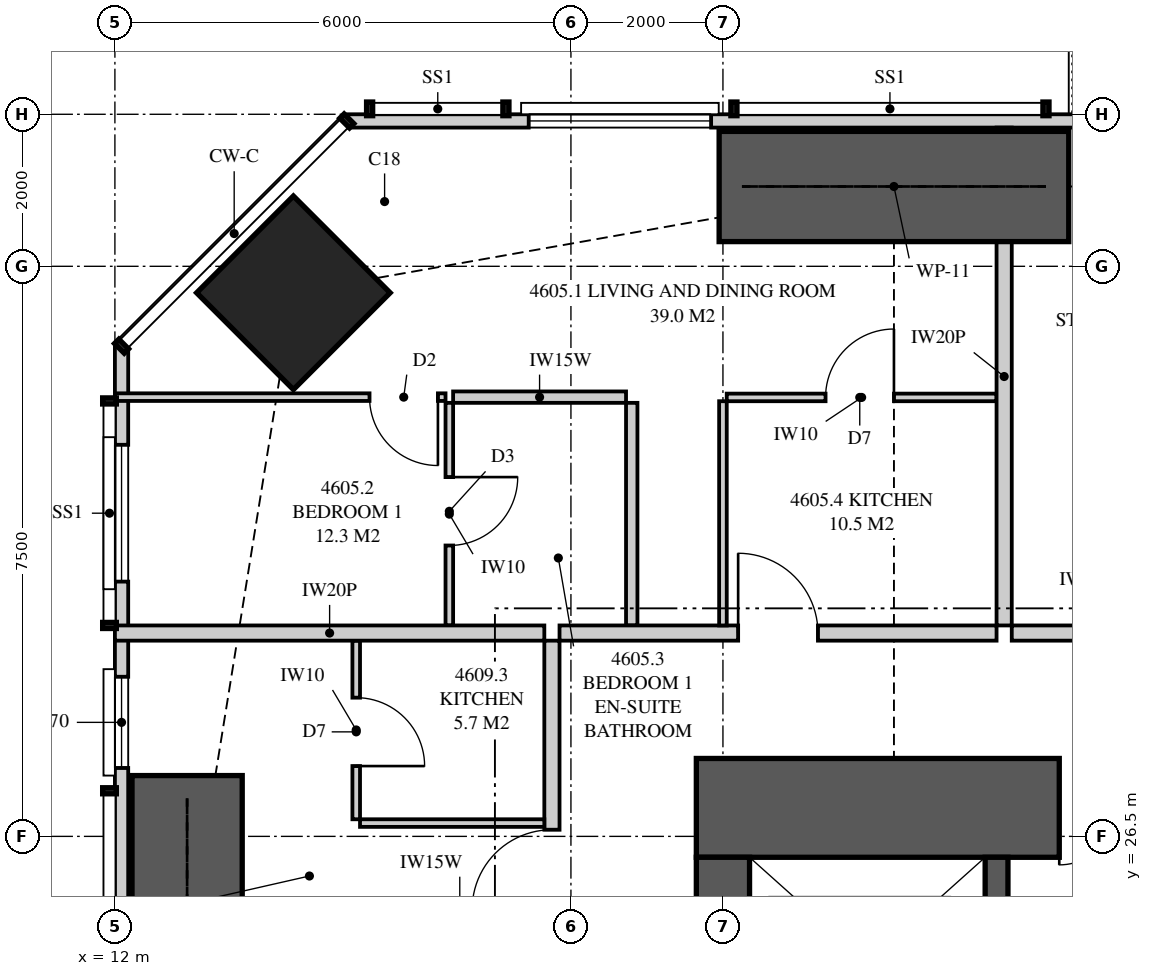
"""IFC4 building model, lengths in metres.
Left out: names, types, materials, properties, quantities, classifications, styles, units other than length and angle.
Written with IfcOpenShell. Run it as: python <this file> out.ifc"""

import sys

from ifc_helpers import new_model, si_unit, direction, frame, frame_2d, origin, origin_2d, place, context, subcontext, project, spatial, polyline, rectangle, outline, extrude, element, fill, save


model = new_model("IFC4")
c1 = context("Model", 3, precision=1e-05, world=origin(), true_north=direction((0.0, 1.0)))
c2 = subcontext(c1, "Body", "Model", "MODEL_VIEW")
j1 = project(units=[si_unit("LENGTHUNIT", "METRE"), si_unit("PLANEANGLEUNIT", "RADIAN")], contexts=[c1])
p1 = place(None, origin())
s1 = spatial("IfcSite", under=j1, at=p1, CompositionType="ELEMENT")
p2 = place(p1, origin())
s2 = spatial("IfcBuilding", under=s1, at=p2, CompositionType="ELEMENT")
p3 = place(p2, frame((0.0, 0.0, 171.1)))
s3 = spatial("IfcBuildingStorey", under=s2, at=p3, CompositionType="ELEMENT", Elevation=171.1)
p4 = place(p3, frame((14.348, 33.652, 0.0), z_axis=(0.0, 0.0, 1.0), x_axis=(0.707106781187, 0.707106781187, 0.0)))
e1 = element("IfcColumn", 1, at=p4, inside=s3, PredefinedType="COLUMN", context=c2, shape_type="SweptSolid", body=[
    extrude(rectangle(XDim=1.8, YDim=1.8, at=origin_2d()), origin(), (0.0, 0.0, 1.0), 3.35),
])
p5 = place(p3, frame((26.0, 26.875, 0.0), z_axis=(0.0, 0.0, 1.0), x_axis=(-1.0, 0.0, 0.0)))
e2 = element("IfcWall", 2, at=p5, inside=s3, PredefinedType="SHEAR", context=c2, shape_type="SweptSolid", body=[
    extrude(rectangle(XDim=6.35, YDim=1.3, at=frame_2d((3.175, 0.0))), origin(), (0.0, 0.0, 1.0), 3.35),
])
p6 = place(p5, frame((0.825, 0.0, 0.0)))
e3 = element("IfcOpeningElement", 3, at=p6, cuts=e2, PredefinedType="OPENING", context=c2, shape_type="SweptSolid", body=[
    extrude(rectangle(XDim=0.75, YDim=2.1, at=frame_2d((0.375, 1.05))), frame((0.0, 0.66, 0.0), z_axis=(0.0, -1.0, 0.0), x_axis=(1.0, 0.0, 0.0)), (0.0, 0.0, 1.0), 1.32),
])
p7 = place(p3, frame((20.0, 26.225, 0.0), z_axis=(0.0, 0.0, 1.0), x_axis=(0.0, -1.0, 0.0)))
e4 = element("IfcWall", 4, at=p7, inside=s3, PredefinedType="SHEAR", context=c2, shape_type="SweptSolid", body=[
    extrude(rectangle(XDim=2.925, YDim=0.7, at=frame_2d((1.462, 0.0))), origin(), (0.0, 0.0, 1.0), 3.35),
])
p8 = place(p3, frame((23.6, 23.3, 0.0), z_axis=(0.0, 0.0, 1.0), x_axis=(0.0, 1.0, 0.0)))
e5 = element("IfcWall", 5, at=p8, inside=s3, PredefinedType="SHEAR", context=c2, shape_type="SweptSolid", body=[
    extrude(rectangle(XDim=2.925, YDim=0.3, at=frame_2d((1.462, 0.0))), origin(), (0.0, 0.0, 1.0), 3.35),
])
p9 = place(p3, frame((49.949, 35.913, 0.0), z_axis=(0.0, 0.0, 1.0), x_axis=(-1.0, 0.0, 0.0)))
e6 = element("IfcWall", 6, at=p9, inside=s3, PredefinedType="SOLIDWALL", context=c2, shape_type="SweptSolid", body=[
    extrude(outline(polyline([(0.0, 0.0), (34.897, 0.0), (34.897, 3.11), (27.91, 3.11), (27.91, 2.15), (27.836, 2.15), (27.836, 3.11), (27.699, 3.11), (27.699, 2.15), (7.199, 2.15), (7.199, 3.11), (7.062, 3.11), (7.062, 2.15), (6.987, 2.15), (6.987, 3.11), (0.0, 3.11), (0.0, 0.0)])), frame((0.0, 0.087, 0.0), z_axis=(0.0, -1.0, 0.0), x_axis=(1.0, 0.0, 0.0)), (0.0, 0.0, 1.0), 0.175),
])
p10 = place(p9, frame((2.149, 0.0, 0.4)))
e7 = element("IfcOpeningElement", 7, at=p10, cuts=e6, PredefinedType="OPENING", context=c2, shape_type="SweptSolid", body=[
    extrude(rectangle(XDim=1.8, YDim=1.7, at=frame_2d((0.9, 0.85))), frame((0.0, 0.097, 0.0), z_axis=(0.0, -1.0, 0.0), x_axis=(1.0, 0.0, 0.0)), (0.0, 0.0, 1.0), 0.195),
])
p11 = place(p9, frame((10.299, 0.0, 0.0)))
e8 = element("IfcOpeningElement", 8, at=p11, cuts=e6, PredefinedType="OPENING", context=c2, shape_type="SweptSolid", body=[
    extrude(rectangle(XDim=1.8, YDim=2.1, at=frame_2d((0.9, 1.05))), frame((0.0, 0.097, 0.0), z_axis=(0.0, -1.0, 0.0), x_axis=(1.0, 0.0, 0.0)), (0.0, 0.0, 1.0), 0.195),
])
p12 = place(p9, frame((13.231, 0.0, 0.4)))
e9 = element("IfcOpeningElement", 9, at=p12, cuts=e6, PredefinedType="OPENING", context=c2, shape_type="SweptSolid", body=[
    extrude(rectangle(XDim=1.8, YDim=1.7, at=frame_2d((0.9, 0.85))), frame((0.0, 0.097, 0.0), z_axis=(0.0, -1.0, 0.0), x_axis=(1.0, 0.0, 0.0)), (0.0, 0.0, 1.0), 0.195),
])
p13 = place(p9, frame((22.699, 0.0, 0.0)))
e10 = element("IfcOpeningElement", 10, at=p13, cuts=e6, PredefinedType="OPENING", context=c2, shape_type="SweptSolid", body=[
    extrude(rectangle(XDim=1.8, YDim=2.1, at=frame_2d((0.9, 1.05))), frame((0.0, 0.097, 0.0), z_axis=(0.0, -1.0, 0.0), x_axis=(1.0, 0.0, 0.0)), (0.0, 0.0, 1.0), 0.195),
])
p14 = place(p9, frame((19.853, 0.0, 0.4)))
e11 = element("IfcOpeningElement", 11, at=p14, cuts=e6, PredefinedType="OPENING", context=c2, shape_type="SweptSolid", body=[
    extrude(rectangle(XDim=2.4, YDim=1.7, at=frame_2d((1.2, 0.85))), frame((0.0, 0.097, 0.0), z_axis=(0.0, -1.0, 0.0), x_axis=(1.0, 0.0, 0.0)), (0.0, 0.0, 1.0), 0.195),
])
p15 = place(p9, frame((30.104, 0.0, 0.4)))
e12 = element("IfcOpeningElement", 12, at=p15, cuts=e6, PredefinedType="OPENING", context=c2, shape_type="SweptSolid", body=[
    extrude(rectangle(XDim=2.4, YDim=1.7, at=frame_2d((1.2, 0.85))), frame((0.0, 0.097, 0.0), z_axis=(0.0, -1.0, 0.0), x_axis=(1.0, 0.0, 0.0)), (0.0, 0.0, 1.0), 0.195),
])
p16 = place(p3, frame((12.087, 32.949, 0.0), z_axis=(0.0, 0.0, 1.0), x_axis=(0.0, -1.0, 0.0)))
e13 = element("IfcWall", 13, at=p16, inside=s3, PredefinedType="SOLIDWALL", context=c2, shape_type="SweptSolid", body=[
    extrude(outline(polyline([(0.0, 0.0), (29.897, 0.0), (29.897, 3.11), (20.191, 3.11), (20.191, 2.15), (20.051, 2.15), (20.051, 3.11), (19.949, 3.11), (19.949, 2.15), (7.949, 2.15), (7.949, 3.11), (7.823, 3.11), (7.823, 2.15), (7.73, 2.15), (7.73, 3.11), (0.0, 3.11), (0.0, 0.0)])), frame((0.0, 0.087, 0.0), z_axis=(0.0, -1.0, 0.0), x_axis=(1.0, 0.0, 0.0)), (0.0, 0.0, 1.0), 0.175),
])
p17 = place(p16, frame((1.297, 0.0, 0.4)))
e14 = element("IfcOpeningElement", 14, at=p17, cuts=e13, PredefinedType="OPENING", context=c2, shape_type="SweptSolid", body=[
    extrude(rectangle(XDim=1.8, YDim=1.7, at=frame_2d((0.9, 0.85))), frame((0.0, 0.097, 0.0), z_axis=(0.0, -1.0, 0.0), x_axis=(1.0, 0.0, 0.0)), (0.0, 0.0, 1.0), 0.195),
])
p18 = place(p16, frame((4.349, 0.0, 0.4)))
e15 = element("IfcOpeningElement", 15, at=p18, cuts=e13, PredefinedType="OPENING", context=c2, shape_type="SweptSolid", body=[
    extrude(rectangle(XDim=1.2, YDim=1.7, at=frame_2d((0.6, 0.85))), frame((0.0, 0.097, 0.0), z_axis=(0.0, -1.0, 0.0), x_axis=(1.0, 0.0, 0.0)), (0.0, 0.0, 1.0), 0.195),
])
p19 = place(p16, frame((11.024, 0.0, 0.4)))
e16 = element("IfcOpeningElement", 16, at=p19, cuts=e13, PredefinedType="OPENING", context=c2, shape_type="SweptSolid", body=[
    extrude(rectangle(XDim=1.8, YDim=1.7, at=frame_2d((0.9, 0.85))), frame((0.0, 0.097, 0.0), z_axis=(0.0, -1.0, 0.0), x_axis=(1.0, 0.0, 0.0)), (0.0, 0.0, 1.0), 0.195),
])
p20 = place(p16, frame((15.044, 0.0, 0.4)))
e17 = element("IfcOpeningElement", 17, at=p20, cuts=e13, PredefinedType="OPENING", context=c2, shape_type="SweptSolid", body=[
    extrude(rectangle(XDim=2.4, YDim=1.7, at=frame_2d((1.2, 0.85))), frame((0.0, 0.097, 0.0), z_axis=(0.0, -1.0, 0.0), x_axis=(1.0, 0.0, 0.0)), (0.0, 0.0, 1.0), 0.195),
])
p21 = place(p16, frame((22.624, 0.0, 0.0)))
e18 = element("IfcOpeningElement", 18, at=p21, cuts=e13, PredefinedType="OPENING", context=c2, shape_type="SweptSolid", body=[
    extrude(rectangle(XDim=1.8, YDim=2.1, at=frame_2d((0.9, 1.05))), frame((0.0, 0.097, 0.0), z_axis=(0.0, -1.0, 0.0), x_axis=(1.0, 0.0, 0.0)), (0.0, 0.0, 1.0), 0.195),
])
p22 = place(p16, frame((26.301, 0.0, 0.4)))
e19 = element("IfcOpeningElement", 19, at=p22, cuts=e13, PredefinedType="OPENING", context=c2, shape_type="SweptSolid", body=[
    extrude(rectangle(XDim=1.8, YDim=1.7, at=frame_2d((0.9, 0.85))), frame((0.0, 0.097, 0.0), z_axis=(0.0, -1.0, 0.0), x_axis=(1.0, 0.0, 0.0)), (0.0, 0.0, 1.0), 0.195),
])
p23 = place(p3, frame((23.7, 35.825, 0.0), z_axis=(0.0, 0.0, 1.0), x_axis=(0.0, -1.0, 0.0)))
e20 = element("IfcWall", 20, at=p23, inside=s3, PredefinedType="PARTITIONING", context=c2, shape_type="SweptSolid", body=[
    extrude(outline(polyline([(0.529, 2.15), (0.0, 2.15), (0.0, 0.0), (0.529, 0.0), (0.529, 0.332), (1.021, 0.332), (1.021, 0.0), (6.55, 0.0), (6.55, 3.11), (1.685, 3.11), (1.685, 2.15), (1.021, 2.15), (1.021, 1.818), (0.529, 1.818), (0.529, 2.15)])), frame((0.0, 0.1, 0.0), z_axis=(0.0, -1.0, 0.0), x_axis=(1.0, 0.0, 0.0)), (0.0, 0.0, 1.0), 0.2),
])
p24 = place(p3, frame((17.85, 29.175, 0.0), z_axis=(0.0, 0.0, 1.0), x_axis=(1.0, 0.0, 0.0)))
e21 = element("IfcWall", 21, at=p24, inside=s3, PredefinedType="PARTITIONING", context=c2, shape_type="SweptSolid", body=[
    extrude(outline(polyline([(0.0, 0.0), (5.75, 0.0), (5.75, 3.11), (4.737, 3.11), (4.737, 2.541), (4.062, 2.541), (4.062, 3.11), (0.0, 3.11), (0.0, 0.0)])), frame((0.0, 0.1, 0.0), z_axis=(0.0, -1.0, 0.0), x_axis=(1.0, 0.0, 0.0)), (0.0, 0.0, 1.0), 0.2),
])
p25 = place(p24, frame((2.35, 0.0, 0.0)))
e22 = element("IfcOpeningElement", 22, at=p25, cuts=e21, PredefinedType="OPENING", context=c2, shape_type="SweptSolid", body=[
    extrude(rectangle(XDim=1.05, YDim=2.2, at=frame_2d((0.525, 1.1))), frame((0.0, 0.11, 0.0), z_axis=(0.0, -1.0, 0.0), x_axis=(1.0, 0.0, 0.0)), (0.0, 0.0, 1.0), 0.22),
])
p26 = place(p3, frame((16.4, 32.204, 0.0), z_axis=(0.0, 0.0, 1.0), x_axis=(0.0, -1.0, 0.0)))
e23 = element("IfcWall", 23, at=p26, inside=s3, PredefinedType="PARTITIONING", context=c2, shape_type="SweptSolid", body=[
    extrude(rectangle(XDim=2.929, YDim=0.1, at=frame_2d((1.464, 0.0))), origin(), (0.0, 0.0, 1.0), 3.11),
])
p27 = place(p26, frame((0.977, 0.0, 0.0)))
e24 = element("IfcOpeningElement", 24, at=p27, cuts=e23, PredefinedType="OPENING", context=c2, shape_type="SweptSolid", body=[
    extrude(rectangle(XDim=0.9, YDim=2.1, at=frame_2d((0.45, 1.05))), frame((0.0, 0.06, 0.0), z_axis=(0.0, -1.0, 0.0), x_axis=(1.0, 0.0, 0.0)), (0.0, 0.0, 1.0), 0.12),
])
p28 = place(p3, frame((16.35, 32.279, 0.0), z_axis=(0.0, 0.0, 1.0), x_axis=(-1.0, 0.0, 0.0)))
e25 = element("IfcWall", 25, at=p28, inside=s3, PredefinedType="PARTITIONING", context=c2, shape_type="SweptSolid", body=[
    extrude(outline(polyline([(0.0, 0.0), (4.35, 0.0), (4.35, 3.11), (3.094, 3.11), (3.094, 2.15), (1.352, 2.15), (1.352, 3.11), (0.0, 3.11), (0.0, 0.0)])), frame((0.0, 0.05, 0.0), z_axis=(0.0, -1.0, 0.0), x_axis=(1.0, 0.0, 0.0)), (0.0, 0.0, 1.0), 0.1),
])
p29 = place(p28, frame((0.1, 0.0, 0.0)))
e26 = element("IfcOpeningElement", 26, at=p29, cuts=e25, PredefinedType="OPENING", context=c2, shape_type="SweptSolid", body=[
    extrude(rectangle(XDim=0.9, YDim=2.1, at=frame_2d((0.45, 1.05))), frame((0.0, 0.06, 0.0), z_axis=(0.0, -1.0, 0.0), x_axis=(1.0, 0.0, 0.0)), (0.0, 0.0, 1.0), 0.12),
])
p30 = place(p3, frame((18.725, 32.279, 0.0), z_axis=(0.0, 0.0, 1.0), x_axis=(-1.0, 0.0, 0.0)))
e27 = element("IfcWall", 27, at=p30, inside=s3, PredefinedType="PLUMBINGWALL", context=c2, shape_type="SweptSolid", body=[
    extrude(rectangle(XDim=2.275, YDim=0.15, at=frame_2d((1.138, 0.0))), origin(), (0.0, 0.0, 1.0), 3.11),
])
p31 = place(p3, frame((18.8, 32.204, 0.0), z_axis=(0.0, 0.0, 1.0), x_axis=(0.0, -1.0, 0.0)))
e28 = element("IfcWall", 28, at=p31, inside=s3, PredefinedType="PLUMBINGWALL", context=c2, shape_type="SweptSolid", body=[
    extrude(rectangle(XDim=2.929, YDim=0.15, at=frame_2d((1.464, 0.0))), origin(), (0.0, 0.0, 1.0), 3.11),
])
p32 = place(p3, frame((20.05, 32.275, 0.0), z_axis=(0.0, 0.0, 1.0), x_axis=(1.0, 0.0, 0.0)))
e29 = element("IfcWall", 29, at=p32, inside=s3, PredefinedType="PARTITIONING", context=c2, shape_type="SweptSolid", body=[
    extrude(outline(polyline([(0.0, 0.0), (3.55, 0.0), (3.55, 3.11), (2.487, 3.11), (2.487, 2.541), (1.913, 2.541), (1.913, 3.11), (0.0, 3.11), (0.0, 0.0)])), frame((0.0, 0.05, 0.0), z_axis=(0.0, -1.0, 0.0), x_axis=(1.0, 0.0, 0.0)), (0.0, 0.0, 1.0), 0.1),
])
p33 = place(p32, frame((1.3, 0.0, 0.0)))
e30 = element("IfcOpeningElement", 30, at=p33, cuts=e29, PredefinedType="OPENING", context=c2, shape_type="SweptSolid", body=[
    extrude(rectangle(XDim=0.9, YDim=2.1, at=frame_2d((0.45, 1.05))), frame((0.0, 0.06, 0.0), z_axis=(0.0, -1.0, 0.0), x_axis=(1.0, 0.0, 0.0)), (0.0, 0.0, 1.0), 0.12),
])
p34 = place(p3, frame((20.0, 32.225, 0.0), z_axis=(0.0, 0.0, 1.0), x_axis=(0.0, -1.0, 0.0)))
e31 = element("IfcWall", 31, at=p34, inside=s3, PredefinedType="PARTITIONING", context=c2, shape_type="SweptSolid", body=[
    extrude(rectangle(XDim=2.95, YDim=0.1, at=frame_2d((1.475, 0.0))), origin(), (0.0, 0.0, 1.0), 3.11),
])
p35 = place(p3, frame((23.8, 29.175, 0.0), z_axis=(0.0, 0.0, 1.0), x_axis=(1.0, 0.0, 0.0)))
e32 = element("IfcWall", 32, at=p35, inside=s3, PredefinedType="PARTITIONING", context=c2, shape_type="SweptSolid", body=[
    extrude(rectangle(XDim=1.9, YDim=0.2, at=frame_2d((0.95, 0.0))), origin(), (0.0, 0.0, 1.0), 3.11),
])
p36 = place(p3, frame((12.0, 29.175, 0.0), z_axis=(0.0, 0.0, 1.0), x_axis=(1.0, 0.0, 0.0)))
e33 = element("IfcWall", 33, at=p36, inside=s3, PredefinedType="PARTITIONING", context=c2, shape_type="SweptSolid", body=[
    extrude(outline(polyline([(0.0, 0.0), (5.65, 0.0), (5.65, 3.11), (2.547, 3.11), (2.547, 2.15), (0.703, 2.15), (0.703, 3.11), (0.0, 3.11), (0.0, 0.0)])), frame((0.0, 0.1, 0.0), z_axis=(0.0, -1.0, 0.0), x_axis=(1.0, 0.0, 0.0)), (0.0, 0.0, 1.0), 0.2),
])
p37 = place(p3, frame((17.75, 23.0, 0.0), z_axis=(0.0, 0.0, 1.0), x_axis=(0.0, 1.0, 0.0)))
e34 = element("IfcWall", 34, at=p37, inside=s3, PredefinedType="PARTITIONING", context=c2, shape_type="SweptSolid", body=[
    extrude(outline(polyline([(0.0, 0.0), (6.075, 0.0), (6.075, 3.11), (2.337, 3.11), (2.337, 2.541), (1.663, 2.541), (1.663, 3.11), (0.0, 3.11), (0.0, 0.0)])), frame((0.0, 0.1, 0.0), z_axis=(0.0, -1.0, 0.0), x_axis=(1.0, 0.0, 0.0)), (0.0, 0.0, 1.0), 0.2),
])
p38 = place(p37, frame((2.538, 0.0, 0.0)))
e35 = element("IfcOpeningElement", 35, at=p38, cuts=e34, PredefinedType="OPENING", context=c2, shape_type="SweptSolid", body=[
    extrude(rectangle(XDim=1.05, YDim=2.2, at=frame_2d((0.525, 1.1))), frame((0.0, 0.11, 0.0), z_axis=(0.0, -1.0, 0.0), x_axis=(1.0, 0.0, 0.0)), (0.0, 0.0, 1.0), 0.22),
])
p39 = place(p3, frame((15.175, 26.725, 0.0), z_axis=(0.0, 0.0, 1.0), x_axis=(0.0, 1.0, 0.0)))
e36 = element("IfcWall", 36, at=p39, inside=s3, PredefinedType="PARTITIONING", context=c2, shape_type="SweptSolid", body=[
    extrude(rectangle(XDim=2.35, YDim=0.1, at=frame_2d((1.175, 0.0))), origin(), (0.0, 0.0, 1.0), 3.11),
])
p40 = place(p39, frame((0.7, 0.0, 0.0)))
e37 = element("IfcOpeningElement", 37, at=p40, cuts=e36, PredefinedType="OPENING", context=c2, shape_type="SweptSolid", body=[
    extrude(rectangle(XDim=0.9, YDim=2.1, at=frame_2d((0.45, 1.05))), frame((0.0, 0.06, 0.0), z_axis=(0.0, -1.0, 0.0), x_axis=(1.0, 0.0, 0.0)), (0.0, 0.0, 1.0), 0.12),
])
p41 = place(p3, frame((15.225, 26.675, 0.0), z_axis=(0.0, 0.0, 1.0), x_axis=(1.0, 0.0, 0.0)))
e38 = element("IfcWall", 38, at=p41, inside=s3, PredefinedType="PARTITIONING", context=c2, shape_type="SweptSolid", body=[
    extrude(rectangle(XDim=2.425, YDim=0.1, at=frame_2d((1.212, 0.0))), origin(), (0.0, 0.0, 1.0), 3.11),
])
for number, where, z_axis, x_axis in (
    (39, (19.95, 35.05, 0.0), (0.0, 0.0, 1.0), (1.0, 0.0, 0.0)),
    (40, (12.95, 22.7, 0.0), (0.0, 0.0, 1.0), (0.0, 1.0, 0.0)),
):
    element("IfcWall", number, at=place(p3, frame(where, z_axis=z_axis, x_axis=x_axis)), inside=s3, PredefinedType="SHEAR", context=c2, shape_type="SweptSolid", body=[
        extrude(rectangle(XDim=4.6, YDim=1.45, at=frame_2d((2.3, 0.0))), origin(), (0.0, 0.0, 1.0), 3.35),
    ])
p42 = place(p15, origin())
e41 = element("IfcWindow", 41, at=p42, inside=s3, PartitioningType="SINGLE_PANEL", PredefinedType="WINDOW", context=c2, shape_type="SweptSolid", body=[
    extrude(rectangle(XDim=2.4, YDim=1.7, at=frame_2d((1.2, 0.85))), frame((0.0, 0.03, 0.0), z_axis=(0.0, -1.0, 0.0), x_axis=(1.0, 0.0, 0.0)), (0.0, 0.0, 1.0), 0.06),
])
fill(e12, e41)
p43 = place(p17, origin())
e42 = element("IfcWindow", 42, at=p43, inside=s3, PartitioningType="SINGLE_PANEL", PredefinedType="WINDOW", context=c2, shape_type="SweptSolid", body=[
    extrude(rectangle(XDim=1.8, YDim=1.7, at=frame_2d((0.9, 0.85))), frame((0.0, 0.03, 0.0), z_axis=(0.0, -1.0, 0.0), x_axis=(1.0, 0.0, 0.0)), (0.0, 0.0, 1.0), 0.06),
])
fill(e14, e42)
p44 = place(p18, origin())
e43 = element("IfcWindow", 43, at=p44, inside=s3, PartitioningType="SINGLE_PANEL", PredefinedType="WINDOW", context=c2, shape_type="SweptSolid", body=[
    extrude(rectangle(XDim=1.2, YDim=1.7, at=frame_2d((0.6, 0.85))), frame((0.0, 0.03, 0.0), z_axis=(0.0, -1.0, 0.0), x_axis=(1.0, 0.0, 0.0)), (0.0, 0.0, 1.0), 0.06),
])
fill(e15, e43)
p45 = place(p25, origin())
e44 = element("IfcDoor", 44, at=p45, inside=s3, OperationType="SINGLE_SWING_LEFT", PredefinedType="DOOR", context=c2, shape_type="SweptSolid", body=[
    extrude(rectangle(XDim=1.05, YDim=2.2, at=frame_2d((0.525, 1.1))), frame((0.0, 0.025, 0.0), z_axis=(0.0, -1.0, 0.0), x_axis=(1.0, 0.0, 0.0)), (0.0, 0.0, 1.0), 0.05),
])
fill(e22, e44)
p46 = place(p29, origin())
e45 = element("IfcDoor", 45, at=p46, inside=s3, OperationType="SINGLE_SWING_LEFT", PredefinedType="DOOR", context=c2, shape_type="SweptSolid", body=[
    extrude(rectangle(XDim=0.9, YDim=2.1, at=frame_2d((0.45, 1.05))), frame((0.0, 0.025, 0.0), z_axis=(0.0, -1.0, 0.0), x_axis=(1.0, 0.0, 0.0)), (0.0, 0.0, 1.0), 0.05),
])
fill(e26, e45)
p47 = place(p27, origin())
e46 = element("IfcDoor", 46, at=p47, inside=s3, OperationType="SINGLE_SWING_LEFT", PredefinedType="DOOR", context=c2, shape_type="SweptSolid", body=[
    extrude(rectangle(XDim=0.9, YDim=2.1, at=frame_2d((0.45, 1.05))), frame((0.0, 0.025, 0.0), z_axis=(0.0, -1.0, 0.0), x_axis=(1.0, 0.0, 0.0)), (0.0, 0.0, 1.0), 0.05),
])
fill(e24, e46)
p48 = place(p33, origin())
e47 = element("IfcDoor", 47, at=p48, inside=s3, OperationType="SINGLE_SWING_RIGHT", PredefinedType="DOOR", context=c2, shape_type="SweptSolid", body=[
    extrude(rectangle(XDim=0.9, YDim=2.1, at=frame_2d((0.45, 1.05))), frame((0.0, 0.025, 0.0), z_axis=(0.0, -1.0, 0.0), x_axis=(1.0, 0.0, 0.0)), (0.0, 0.0, 1.0), 0.05),
])
fill(e30, e47)
p49 = place(p38, origin())
e48 = element("IfcDoor", 48, at=p49, inside=s3, OperationType="SINGLE_SWING_LEFT", PredefinedType="DOOR", context=c2, shape_type="SweptSolid", body=[
    extrude(rectangle(XDim=1.05, YDim=2.2, at=frame_2d((0.525, 1.1))), frame((0.0, 0.025, 0.0), z_axis=(0.0, -1.0, 0.0), x_axis=(1.0, 0.0, 0.0)), (0.0, 0.0, 1.0), 0.05),
])
fill(e35, e48)
p50 = place(p40, frame((0.9, 0.0, 0.0), z_axis=(0.0, 0.0, 1.0), x_axis=(-1.0, 0.0, 0.0)))
e49 = element("IfcDoor", 49, at=p50, inside=s3, OperationType="SINGLE_SWING_RIGHT", PredefinedType="DOOR", context=c2, shape_type="SweptSolid", body=[
    extrude(rectangle(XDim=0.9, YDim=2.1, at=frame_2d((0.45, 1.05))), frame((0.0, 0.025, 0.0), z_axis=(0.0, -1.0, 0.0), x_axis=(1.0, 0.0, 0.0)), (0.0, 0.0, 1.0), 0.05),
])
fill(e37, e49)
p51 = place(p6, origin())
e50 = element("IfcDoor", 50, at=p51, inside=s3, OperationType="SINGLE_SWING_RIGHT", PredefinedType="DOOR", context=c2, shape_type="SweptSolid", body=[
    extrude(rectangle(XDim=0.75, YDim=2.1, at=frame_2d((0.375, 1.05))), frame((0.0, 0.025, 0.0), z_axis=(0.0, -1.0, 0.0), x_axis=(1.0, 0.0, 0.0)), (0.0, 0.0, 1.0), 0.05),
])
fill(e3, e50)
save(model, sys.argv[1])
